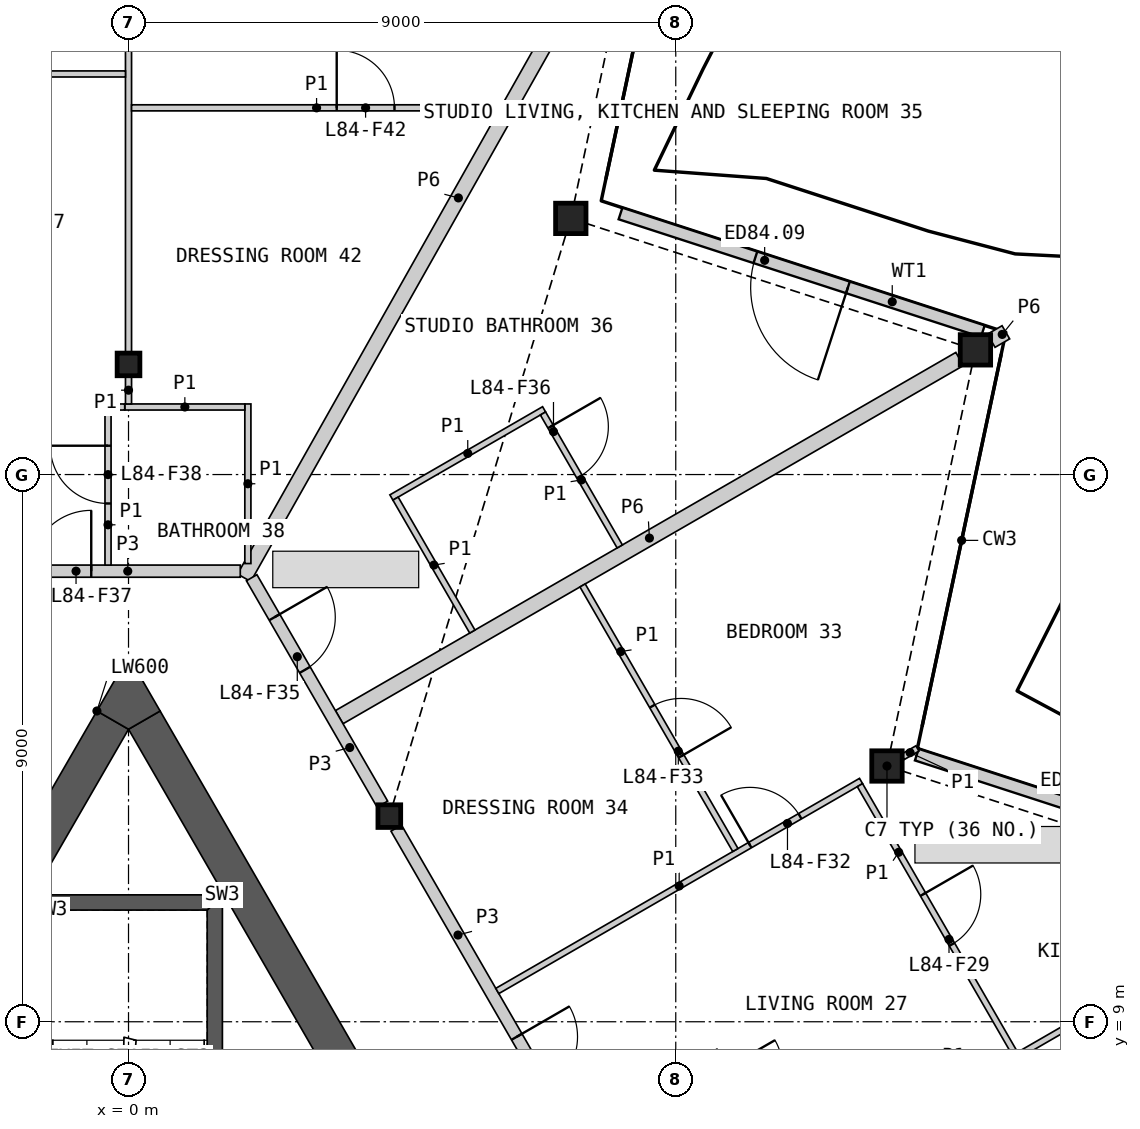
"""IFC4 building model, lengths in metres.
Left out: names, types, materials, properties, quantities, classifications, styles, units other than length and angle.
Written with IfcOpenShell. Run it as: python <this file> out.ifc"""

import sys

from ifc_helpers import new_model, si_unit, direction, frame, frame_2d, origin, origin_2d, place, context, subcontext, project, spatial, polyline, rectangle, hollow_rectangle, i_section, outline, extrude, element, fill, save


model = new_model("IFC4")
c1 = context("Model", 3, precision=1e-05, world=origin(), true_north=direction((0.0, 1.0)))
c2 = subcontext(c1, "Body", "Model", "MODEL_VIEW")
j1 = project(units=[si_unit("LENGTHUNIT", "METRE"), si_unit("PLANEANGLEUNIT", "RADIAN")], contexts=[c1])
p1 = place(None, origin())
s1 = spatial("IfcSite", under=j1, at=p1, CompositionType="ELEMENT")
p2 = place(p1, origin())
s2 = spatial("IfcBuilding", under=s1, at=p2, CompositionType="ELEMENT")
p3 = place(p2, frame((0.0, 0.0, 374.6)))
s3 = spatial("IfcBuildingStorey", under=s2, at=p3, CompositionType="ELEMENT", Elevation=374.6)
for number, where, z_axis, x_axis in (
    (1, (12.474, 13.206, 0.0), (0.0, 0.0, 1.0), (1.0, 0.0, 0.0)),
    (2, (13.929, 20.051, 0.0), (0.0, 0.0, 1.0), (1.0, 0.0, 0.0)),
    (3, (7.274, 22.213, 0.0), (0.0, 0.0, 1.0), (1.0, 0.0, 0.0)),
):
    element("IfcColumn", number, at=place(p3, frame(where, z_axis=z_axis, x_axis=x_axis)), inside=s3, PredefinedType="COLUMN", context=c2, shape_type="SweptSolid", body=[
        extrude(hollow_rectangle(XDim=0.5, YDim=0.5, WallThickness=0.03, at=origin_2d()), origin(), (0.0, 0.0, 1.0), 3.4),
    ])
for number, where, z_axis, x_axis in (
    (4, (0.0, 19.811, 0.0), (0.0, 0.0, 1.0), (1.0, 0.0, 0.0)),
    (5, (4.289, 12.382, 0.0), (0.0, 0.0, 1.0), (1.0, 0.0, 0.0)),
):
    element("IfcColumn", number, at=place(p3, frame(where, z_axis=z_axis, x_axis=x_axis)), inside=s3, PredefinedType="COLUMN", context=c2, shape_type="SweptSolid", body=[
        extrude(i_section(OverallWidth=0.374, OverallDepth=0.372, WebThickness=0.016, FlangeThickness=0.026, at=origin_2d()), origin(), (0.0, 0.0, 1.0), 3.4),
    ])
p4 = place(p3, frame((19.25, 11.351, 0.0), z_axis=(0.0, 0.0, 1.0), x_axis=(-0.951060668786, 0.309004214029, 0.0)))
e6 = element("IfcWall", 6, at=p4, inside=s3, PredefinedType="SOLIDWALL", context=c2, shape_type="SweptSolid", body=[
    extrude(rectangle(XDim=6.609, YDim=0.2, at=frame_2d((3.305, 0.0))), origin(), (0.0, 0.0, 1.0), 2.634),
])
p5 = place(p4, frame((2.333, 0.0, 0.0)))
e7 = element("IfcOpeningElement", 7, at=p5, cuts=e6, PredefinedType="OPENING", context=c2, shape_type="SweptSolid", body=[
    extrude(rectangle(XDim=1.6, YDim=2.25, at=frame_2d((0.8, 1.125))), frame((0.0, 0.11, 0.0), z_axis=(0.0, -1.0, 0.0), x_axis=(1.0, 0.0, 0.0)), (0.0, 0.0, 1.0), 0.22),
])
p6 = place(p3, frame((14.05, 20.357, 0.0), z_axis=(0.0, 0.0, 1.0), x_axis=(-0.951060123915, 0.309005891041, 0.0)))
e8 = element("IfcWall", 8, at=p6, inside=s3, PredefinedType="SOLIDWALL", context=c2, shape_type="SweptSolid", body=[
    extrude(rectangle(XDim=6.265, YDim=0.2, at=frame_2d((3.133, 0.0))), origin(), (0.0, 0.0, 1.0), 2.634),
])
p7 = place(p6, frame((2.333, 0.0, 0.0)))
e9 = element("IfcOpeningElement", 9, at=p7, cuts=e8, PredefinedType="OPENING", context=c2, shape_type="SweptSolid", body=[
    extrude(rectangle(XDim=1.6, YDim=2.25, at=frame_2d((0.8, 1.125))), frame((0.0, 0.11, 0.0), z_axis=(0.0, -1.0, 0.0), x_axis=(1.0, 0.0, 0.0)), (0.0, 0.0, 1.0), 0.22),
])
p8 = place(p3, origin())
e10 = element("IfcWall", 10, at=p8, inside=s3, PredefinedType="SHEAR", context=c2, shape_type="SweptSolid", body=[
    extrude(outline(polyline([(1.544, 5.237), (1.544, 11.087), (1.294, 10.837), (1.294, 5.237), (1.544, 5.237)])), origin(), (0.0, 0.0, 1.0), 3.1),
])
p9 = place(p3, origin())
e11 = element("IfcWall", 11, at=p9, inside=s3, PredefinedType="SHEAR", context=c2, shape_type="SweptSolid", body=[
    extrude(outline(polyline([(1.544, 11.087), (-1.544, 11.087), (-1.294, 10.837), (1.294, 10.837), (1.544, 11.087)])), origin(), (0.0, 0.0, 1.0), 3.1),
])
p10 = place(p3, frame((8.686, -0.634, 0.0), z_axis=(0.0, 0.0, 1.0), x_axis=(-0.500004601921, 0.866022746848, 0.0)))
e12 = element("IfcWall", 12, at=p10, inside=s3, PredefinedType="SHEAR", context=c2, shape_type="SweptSolid", body=[
    extrude(rectangle(XDim=16.853, YDim=0.6, at=frame_2d((8.426, 0.0))), origin(), (0.0, 0.0, 1.0), 3.1),
])
p11 = place(p3, frame((-0.26, 13.961, 0.0), z_axis=(0.0, 0.0, 1.0), x_axis=(-0.50000604952, -0.866021911064, 0.0)))
e13 = element("IfcWall", 13, at=p11, inside=s3, PredefinedType="SHEAR", context=c2, shape_type="SweptSolid", body=[
    extrude(rectangle(XDim=4.869, YDim=0.6, at=frame_2d((2.434, 0.0))), origin(), (0.0, 0.0, 1.0), 3.1),
])
p12 = place(p3, origin())
e14 = element("IfcWall", 14, at=p12, inside=s3, PredefinedType="SHEAR", context=c2, shape_type="SweptSolid", body=[
    extrude(outline(polyline([(-0.52, 14.111), (0.0, 15.011), (0.52, 14.111), (0.0, 13.811), (-0.52, 14.111)])), origin(), (0.0, 0.0, 1.0), 3.1),
])
p13 = place(p3, frame((1.902, 16.302, 0.0), z_axis=(0.0, 0.0, 1.0), x_axis=(0.491233789602, 0.871027763021, 0.0)))
e15 = element("IfcWall", 15, at=p13, inside=s3, PredefinedType="PARTITIONING", context=c2, shape_type="SweptSolid", body=[
    extrude(rectangle(XDim=14.345, YDim=0.25, at=frame_2d((7.173, 0.0))), origin(), (0.0, 0.0, 1.0), 2.33),
])
p14 = place(p3, frame((3.465, 14.01, 0.0), z_axis=(0.0, 0.0, 1.0), x_axis=(0.866032376801, 0.499987922186, 0.0)))
e16 = element("IfcWall", 16, at=p14, inside=s3, PredefinedType="PARTITIONING", context=c2, shape_type="SweptSolid", body=[
    extrude(rectangle(XDim=11.782, YDim=0.25, at=frame_2d((5.891, 0.0))), origin(), (0.0, 0.0, 1.0), 2.33),
])
p15 = place(p3, frame((4.403, 12.185, 0.0), z_axis=(0.0, 0.0, 1.0), x_axis=(0.499992155518, -0.866029932751, 0.0)))
e17 = element("IfcWall", 17, at=p15, inside=s3, PredefinedType="PARTITIONING", context=c2, shape_type="SweptSolid", body=[
    extrude(rectangle(XDim=8.123, YDim=0.2, at=frame_2d((4.062, 0.0))), origin(), (0.0, 0.0, 1.0), 3.1),
])
p16 = place(p15, frame((3.963, 0.0, 0.0)))
e18 = element("IfcOpeningElement", 18, at=p16, cuts=e17, PredefinedType="OPENING", context=c2, shape_type="SweptSolid", body=[
    extrude(rectangle(XDim=1.0, YDim=2.1, at=frame_2d((0.5, 1.05))), frame((0.0, 0.11, 0.0), z_axis=(0.0, -1.0, 0.0), x_axis=(1.0, 0.0, 0.0)), (0.0, 0.0, 1.0), 0.22),
])
p17 = place(p3, frame((2.025, 16.303, 0.0), z_axis=(0.0, 0.0, 1.0), x_axis=(0.500004215162, -0.866022970146, 0.0)))
e19 = element("IfcWall", 19, at=p17, inside=s3, PredefinedType="PARTITIONING", context=c2, shape_type="SweptSolid", body=[
    extrude(rectangle(XDim=4.3, YDim=0.2, at=frame_2d((2.15, 0.0))), origin(), (0.0, 0.0, 1.0), 3.1),
])
p18 = place(p17, frame((0.75, 0.0, 0.0)))
e20 = element("IfcOpeningElement", 20, at=p18, cuts=e19, PredefinedType="OPENING", context=c2, shape_type="SweptSolid", body=[
    extrude(rectangle(XDim=1.0, YDim=2.1, at=frame_2d((0.5, 1.05))), frame((0.0, 0.11, 0.0), z_axis=(0.0, -1.0, 0.0), x_axis=(1.0, 0.0, 0.0)), (0.0, 0.0, 1.0), 0.22),
])
p19 = place(p3, frame((-1.863, 16.411, 0.0), z_axis=(0.0, 0.0, 1.0), x_axis=(1.0, 0.0, 0.0)))
e21 = element("IfcWall", 21, at=p19, inside=s3, PredefinedType="PARTITIONING", context=c2, shape_type="SweptSolid", body=[
    extrude(rectangle(XDim=3.701, YDim=0.2, at=frame_2d((1.851, 0.0))), origin(), (0.0, 0.0, 1.0), 3.1),
])
p20 = place(p19, frame((0.25, 0.0, 0.0)))
e22 = element("IfcOpeningElement", 22, at=p20, cuts=e21, PredefinedType="OPENING", context=c2, shape_type="SweptSolid", body=[
    extrude(rectangle(XDim=1.0, YDim=2.1, at=frame_2d((0.5, 1.05))), frame((0.0, 0.11, 0.0), z_axis=(0.0, -1.0, 0.0), x_axis=(1.0, 0.0, 0.0)), (0.0, 0.0, 1.0), 0.22),
])
p21 = place(p3, frame((14.189, 20.201, 0.0), z_axis=(0.0, 0.0, 1.0), x_axis=(0.865687176694, 0.50058536945, 0.0)))
e23 = element("IfcWall", 23, at=p21, inside=s3, PredefinedType="PARTITIONING", context=c2, shape_type="SweptSolid", body=[
    extrude(rectangle(XDim=0.278, YDim=0.25, at=frame_2d((0.139, 0.0))), origin(), (0.0, 0.0, 1.0), 2.33),
])
p22 = place(p3, frame((8.775, 5.066, 0.0), z_axis=(0.0, 0.0, 1.0), x_axis=(0.866023724155, 0.500002909193, 0.0)))
e24 = element("IfcWall", 24, at=p22, inside=s3, PredefinedType="PARTITIONING", context=c2, shape_type="SweptSolid", body=[
    extrude(rectangle(XDim=11.655, YDim=0.1, at=frame_2d((5.827, 0.0))), origin(), (0.0, 0.0, 1.0), 2.33),
])
p23 = place(p22, frame((3.751, 0.0, 0.0)))
e25 = element("IfcOpeningElement", 25, at=p23, cuts=e24, PredefinedType="OPENING", context=c2, shape_type="SweptSolid", body=[
    extrude(rectangle(XDim=0.95, YDim=2.1, at=frame_2d((0.475, 1.05))), frame((0.0, 0.06, 0.0), z_axis=(0.0, -1.0, 0.0), x_axis=(1.0, 0.0, 0.0)), (0.0, 0.0, 1.0), 0.12),
])
p24 = place(p3, frame((0.0, 20.008, 0.0), z_axis=(0.0, 0.0, 1.0), x_axis=(0.0, 1.0, 0.0)))
e26 = element("IfcWall", 26, at=p24, inside=s3, PredefinedType="PARTITIONING", context=c2, shape_type="SweptSolid", body=[
    extrude(rectangle(XDim=10.951, YDim=0.1, at=frame_2d((5.476, 0.0))), origin(), (0.0, 0.0, 1.0), 2.33),
])
p25 = place(p24, frame((8.851, 0.0, 0.0)))
e27 = element("IfcOpeningElement", 27, at=p25, cuts=e26, PredefinedType="OPENING", context=c2, shape_type="SweptSolid", body=[
    extrude(rectangle(XDim=0.95, YDim=2.1, at=frame_2d((0.475, 1.05))), frame((0.0, 0.06, 0.0), z_axis=(0.0, -1.0, 0.0), x_axis=(1.0, 0.0, 0.0)), (0.0, 0.0, 1.0), 0.12),
])
p26 = place(p3, frame((6.065, 9.506, 0.0), z_axis=(0.0, 0.0, 1.0), x_axis=(0.866029020252, 0.499993736042, 0.0)))
e28 = element("IfcWall", 28, at=p26, inside=s3, PredefinedType="PARTITIONING", context=c2, shape_type="SweptSolid", body=[
    extrude(rectangle(XDim=6.907, YDim=0.1, at=frame_2d((3.454, 0.0))), origin(), (0.0, 0.0, 1.0), 2.33),
])
p27 = place(p26, frame((4.798, 0.0, 0.0)))
e29 = element("IfcOpeningElement", 29, at=p27, cuts=e28, PredefinedType="OPENING", context=c2, shape_type="SweptSolid", body=[
    extrude(rectangle(XDim=0.95, YDim=2.1, at=frame_2d((0.475, 1.05))), frame((0.0, 0.06, 0.0), z_axis=(0.0, -1.0, 0.0), x_axis=(1.0, 0.0, 0.0)), (0.0, 0.0, 1.0), 0.12),
])
p28 = place(p3, frame((-6.475, 24.589, 0.0), z_axis=(0.0, 0.0, 1.0), x_axis=(1.0, 0.0, 0.0)))
e30 = element("IfcWall", 30, at=p28, inside=s3, PredefinedType="PARTITIONING", context=c2, shape_type="SweptSolid", body=[
    extrude(rectangle(XDim=6.425, YDim=0.1, at=frame_2d((3.212, 0.0))), origin(), (0.0, 0.0, 1.0), 2.33),
])
p29 = place(p28, frame((3.499, 0.0, 0.0)))
e31 = element("IfcOpeningElement", 31, at=p29, cuts=e30, PredefinedType="OPENING", context=c2, shape_type="SweptSolid", body=[
    extrude(rectangle(XDim=0.95, YDim=2.1, at=frame_2d((0.475, 1.05))), frame((0.0, 0.06, 0.0), z_axis=(0.0, -1.0, 0.0), x_axis=(1.0, 0.0, 0.0)), (0.0, 0.0, 1.0), 0.12),
])
p30 = place(p3, frame((0.05, 24.031, 0.0), z_axis=(0.0, 0.0, 1.0), x_axis=(1.0, 0.0, 0.0)))
e32 = element("IfcWall", 32, at=p30, inside=s3, PredefinedType="PARTITIONING", context=c2, shape_type="SweptSolid", body=[
    extrude(rectangle(XDim=6.086, YDim=0.1, at=frame_2d((3.043, 0.0))), origin(), (0.0, 0.0, 1.0), 2.33),
])
p31 = place(p30, frame((3.374, 0.0, 0.0)))
e33 = element("IfcOpeningElement", 33, at=p31, cuts=e32, PredefinedType="OPENING", context=c2, shape_type="SweptSolid", body=[
    extrude(rectangle(XDim=0.95, YDim=2.1, at=frame_2d((0.475, 1.05))), frame((0.0, 0.06, 0.0), z_axis=(0.0, -1.0, 0.0), x_axis=(1.0, 0.0, 0.0)), (0.0, 0.0, 1.0), 0.12),
])
p32 = place(p3, frame((7.468, 16.176, 0.0), z_axis=(0.0, 0.0, 1.0), x_axis=(0.499990214365, -0.86603105345, 0.0)))
e34 = element("IfcWall", 34, at=p32, inside=s3, PredefinedType="PARTITIONING", context=c2, shape_type="SweptSolid", body=[
    extrude(rectangle(XDim=5.025, YDim=0.1, at=frame_2d((2.512, 0.0))), origin(), (0.0, 0.0, 1.0), 2.33),
])
p33 = place(p32, frame((2.293, 0.0, 0.0)))
e35 = element("IfcOpeningElement", 35, at=p33, cuts=e34, PredefinedType="OPENING", context=c2, shape_type="SweptSolid", body=[
    extrude(rectangle(XDim=0.95, YDim=2.1, at=frame_2d((0.475, 1.05))), frame((0.0, 0.06, 0.0), z_axis=(0.0, -1.0, 0.0), x_axis=(1.0, 0.0, 0.0)), (0.0, 0.0, 1.0), 0.12),
])
p34 = place(p3, frame((12.029, 12.892, 0.0), z_axis=(0.0, 0.0, 1.0), x_axis=(0.500005610874, -0.86602216432, 0.0)))
e36 = element("IfcWall", 36, at=p34, inside=s3, PredefinedType="PARTITIONING", context=c2, shape_type="SweptSolid", body=[
    extrude(rectangle(XDim=5.1, YDim=0.1, at=frame_2d((2.55, 0.0))), origin(), (0.0, 0.0, 1.0), 2.33),
])
p35 = place(p34, frame((2.075, 0.0, 0.0)))
e37 = element("IfcOpeningElement", 37, at=p35, cuts=e36, PredefinedType="OPENING", context=c2, shape_type="SweptSolid", body=[
    extrude(rectangle(XDim=0.95, YDim=2.1, at=frame_2d((0.475, 1.05))), frame((0.0, 0.06, 0.0), z_axis=(0.0, -1.0, 0.0), x_axis=(1.0, 0.0, 0.0)), (0.0, 0.0, 1.0), 0.12),
])
p36 = place(p3, frame((4.323, 17.623, 0.0), z_axis=(0.0, 0.0, 1.0), x_axis=(0.866032775405, 0.499987231761, 0.0)))
e38 = element("IfcWall", 38, at=p36, inside=s3, PredefinedType="PARTITIONING", context=c2, shape_type="SweptSolid", body=[
    extrude(rectangle(XDim=2.9, YDim=0.1, at=frame_2d((1.45, 0.0))), origin(), (0.0, 0.0, 1.0), 2.33),
])
p37 = place(p3, frame((1.963, 16.536, 0.0), z_axis=(0.0, 0.0, 1.0), x_axis=(0.0, 1.0, 0.0)))
e39 = element("IfcWall", 39, at=p37, inside=s3, PredefinedType="PARTITIONING", context=c2, shape_type="SweptSolid", body=[
    extrude(rectangle(XDim=2.625, YDim=0.1, at=frame_2d((1.312, 0.0))), origin(), (0.0, 0.0, 1.0), 2.33),
])
p38 = place(p3, frame((6.817, 19.004, 0.0), z_axis=(0.0, 0.0, 1.0), x_axis=(0.499976333282, -0.866039067339, 0.0)))
e40 = element("IfcWall", 40, at=p38, inside=s3, PredefinedType="PARTITIONING", context=c2, shape_type="SweptSolid", body=[
    extrude(rectangle(XDim=2.525, YDim=0.1, at=frame_2d((1.262, 0.0))), origin(), (0.0, 0.0, 1.0), 2.33),
])
p39 = place(p38, frame((0.25, 0.0, 0.0)))
e41 = element("IfcOpeningElement", 41, at=p39, cuts=e40, PredefinedType="OPENING", context=c2, shape_type="SweptSolid", body=[
    extrude(rectangle(XDim=0.95, YDim=2.1, at=frame_2d((0.475, 1.05))), frame((0.0, 0.06, 0.0), z_axis=(0.0, -1.0, 0.0), x_axis=(1.0, 0.0, 0.0)), (0.0, 0.0, 1.0), 0.12),
])
p40 = place(p3, frame((4.392, 17.604, 0.0), z_axis=(0.0, 0.0, 1.0), x_axis=(0.500048846702, -0.865997200291, 0.0)))
e42 = element("IfcWall", 42, at=p40, inside=s3, PredefinedType="PARTITIONING", context=c2, shape_type="SweptSolid", body=[
    extrude(rectangle(XDim=2.525, YDim=0.1, at=frame_2d((1.263, 0.0))), origin(), (0.0, 0.0, 1.0), 2.33),
])
p41 = place(p3, frame((-0.337, 16.511, 0.0), z_axis=(0.0, 0.0, 1.0), x_axis=(0.0, 1.0, 0.0)))
e43 = element("IfcWall", 43, at=p41, inside=s3, PredefinedType="PARTITIONING", context=c2, shape_type="SweptSolid", body=[
    extrude(rectangle(XDim=2.649, YDim=0.1, at=frame_2d((1.325, 0.0))), origin(), (0.0, 0.0, 1.0), 2.33),
])
p42 = place(p41, frame((1.013, 0.0, 0.0)))
e44 = element("IfcOpeningElement", 44, at=p42, cuts=e43, PredefinedType="OPENING", context=c2, shape_type="SweptSolid", body=[
    extrude(rectangle(XDim=0.95, YDim=2.1, at=frame_2d((0.475, 1.05))), frame((0.0, 0.06, 0.0), z_axis=(0.0, -1.0, 0.0), x_axis=(1.0, 0.0, 0.0)), (0.0, 0.0, 1.0), 0.12),
])
p43 = place(p3, frame((-0.06, 19.111, 0.0), z_axis=(0.0, 0.0, 1.0), x_axis=(1.0, 0.0, 0.0)))
e45 = element("IfcWall", 45, at=p43, inside=s3, PredefinedType="PARTITIONING", context=c2, shape_type="SweptSolid", body=[
    extrude(rectangle(XDim=1.973, YDim=0.1, at=frame_2d((0.987, 0.0))), origin(), (0.0, 0.0, 1.0), 2.33),
])
p44 = place(p3, frame((0.0, 19.161, 0.0), z_axis=(0.0, 0.0, 1.0), x_axis=(0.0, 1.0, 0.0)))
e46 = element("IfcWall", 46, at=p44, inside=s3, PredefinedType="PARTITIONING", context=c2, shape_type="SweptSolid", body=[
    extrude(rectangle(XDim=0.453, YDim=0.1, at=frame_2d((0.227, 0.0))), origin(), (0.0, 0.0, 1.0), 2.33),
])
p45 = place(p3, frame((12.734, 13.356, 0.0), z_axis=(0.0, 0.0, 1.0), x_axis=(0.865687176694, 0.50058536945, 0.0)))
e47 = element("IfcWall", 47, at=p45, inside=s3, PredefinedType="PARTITIONING", context=c2, shape_type="SweptSolid", body=[
    extrude(rectangle(XDim=0.278, YDim=0.1, at=frame_2d((0.139, 0.0))), origin(), (0.0, 0.0, 1.0), 2.33),
])
p46 = place(p3, frame((-0.287, 19.11, 0.0), z_axis=(0.0, 0.0, 1.0), x_axis=(0.999994683407, 0.003260852229, 0.0)))
e48 = element("IfcWall", 48, at=p46, inside=s3, PredefinedType="PARTITIONING", context=c2, shape_type="SweptSolid", body=[
    extrude(rectangle(XDim=0.225, YDim=0.1, at=frame_2d((0.112, 0.0))), origin(), (0.0, 0.0, 1.0), 2.33),
])
p47 = place(p7, origin())
e49 = element("IfcDoor", 49, at=p47, inside=s3, OperationType="DOUBLE_DOOR_SINGLE_SWING", PredefinedType="DOOR", context=c2, shape_type="SweptSolid", body=[
    extrude(rectangle(XDim=1.6, YDim=2.25, at=frame_2d((0.8, 1.125))), frame((0.0, 0.025, 0.0), z_axis=(0.0, -1.0, 0.0), x_axis=(1.0, 0.0, 0.0)), (0.0, 0.0, 1.0), 0.05),
])
fill(e9, e49)
p48 = place(p16, origin())
e50 = element("IfcDoor", 50, at=p48, inside=s3, OperationType="SINGLE_SWING_LEFT", PredefinedType="DOOR", context=c2, shape_type="SweptSolid", body=[
    extrude(rectangle(XDim=1.0, YDim=2.1, at=frame_2d((0.5, 1.05))), frame((0.0, 0.025, 0.0), z_axis=(0.0, -1.0, 0.0), x_axis=(1.0, 0.0, 0.0)), (0.0, 0.0, 1.0), 0.05),
])
fill(e18, e50)
p49 = place(p35, origin())
e51 = element("IfcDoor", 51, at=p49, inside=s3, OperationType="SINGLE_SWING_LEFT", PredefinedType="DOOR", context=c2, shape_type="SweptSolid", body=[
    extrude(rectangle(XDim=0.95, YDim=2.1, at=frame_2d((0.475, 1.05))), frame((0.0, 0.025, 0.0), z_axis=(0.0, -1.0, 0.0), x_axis=(1.0, 0.0, 0.0)), (0.0, 0.0, 1.0), 0.05),
])
fill(e37, e51)
p50 = place(p27, origin())
e52 = element("IfcDoor", 52, at=p50, inside=s3, OperationType="SINGLE_SWING_LEFT", PredefinedType="DOOR", context=c2, shape_type="SweptSolid", body=[
    extrude(rectangle(XDim=0.95, YDim=2.1, at=frame_2d((0.475, 1.05))), frame((0.0, 0.025, 0.0), z_axis=(0.0, -1.0, 0.0), x_axis=(1.0, 0.0, 0.0)), (0.0, 0.0, 1.0), 0.05),
])
fill(e29, e52)
p51 = place(p33, origin())
e53 = element("IfcDoor", 53, at=p51, inside=s3, OperationType="SINGLE_SWING_RIGHT", PredefinedType="DOOR", context=c2, shape_type="SweptSolid", body=[
    extrude(rectangle(XDim=0.95, YDim=2.1, at=frame_2d((0.475, 1.05))), frame((0.0, 0.025, 0.0), z_axis=(0.0, -1.0, 0.0), x_axis=(1.0, 0.0, 0.0)), (0.0, 0.0, 1.0), 0.05),
])
fill(e35, e53)
p52 = place(p18, origin())
e54 = element("IfcDoor", 54, at=p52, inside=s3, OperationType="SINGLE_SWING_LEFT", PredefinedType="DOOR", context=c2, shape_type="SweptSolid", body=[
    extrude(rectangle(XDim=1.0, YDim=2.1, at=frame_2d((0.5, 1.05))), frame((0.0, 0.025, 0.0), z_axis=(0.0, -1.0, 0.0), x_axis=(1.0, 0.0, 0.0)), (0.0, 0.0, 1.0), 0.05),
])
fill(e20, e54)
p53 = place(p39, origin())
e55 = element("IfcDoor", 55, at=p53, inside=s3, OperationType="SINGLE_SWING_LEFT", PredefinedType="DOOR", context=c2, shape_type="SweptSolid", body=[
    extrude(rectangle(XDim=0.95, YDim=2.1, at=frame_2d((0.475, 1.05))), frame((0.0, 0.025, 0.0), z_axis=(0.0, -1.0, 0.0), x_axis=(1.0, 0.0, 0.0)), (0.0, 0.0, 1.0), 0.05),
])
fill(e41, e55)
p54 = place(p20, origin())
e56 = element("IfcDoor", 56, at=p54, inside=s3, OperationType="SINGLE_SWING_RIGHT", PredefinedType="DOOR", context=c2, shape_type="SweptSolid", body=[
    extrude(rectangle(XDim=1.0, YDim=2.1, at=frame_2d((0.5, 1.05))), frame((0.0, 0.025, 0.0), z_axis=(0.0, -1.0, 0.0), x_axis=(1.0, 0.0, 0.0)), (0.0, 0.0, 1.0), 0.05),
])
fill(e22, e56)
p55 = place(p42, origin())
e57 = element("IfcDoor", 57, at=p55, inside=s3, OperationType="SINGLE_SWING_RIGHT", PredefinedType="DOOR", context=c2, shape_type="SweptSolid", body=[
    extrude(rectangle(XDim=0.95, YDim=2.1, at=frame_2d((0.475, 1.05))), frame((0.0, 0.025, 0.0), z_axis=(0.0, -1.0, 0.0), x_axis=(1.0, 0.0, 0.0)), (0.0, 0.0, 1.0), 0.05),
])
fill(e44, e57)
p56 = place(p31, origin())
e58 = element("IfcDoor", 58, at=p56, inside=s3, OperationType="SINGLE_SWING_LEFT", PredefinedType="DOOR", context=c2, shape_type="SweptSolid", body=[
    extrude(rectangle(XDim=0.95, YDim=2.1, at=frame_2d((0.475, 1.05))), frame((0.0, 0.025, 0.0), z_axis=(0.0, -1.0, 0.0), x_axis=(1.0, 0.0, 0.0)), (0.0, 0.0, 1.0), 0.05),
])
fill(e33, e58)
save(model, sys.argv[1])
